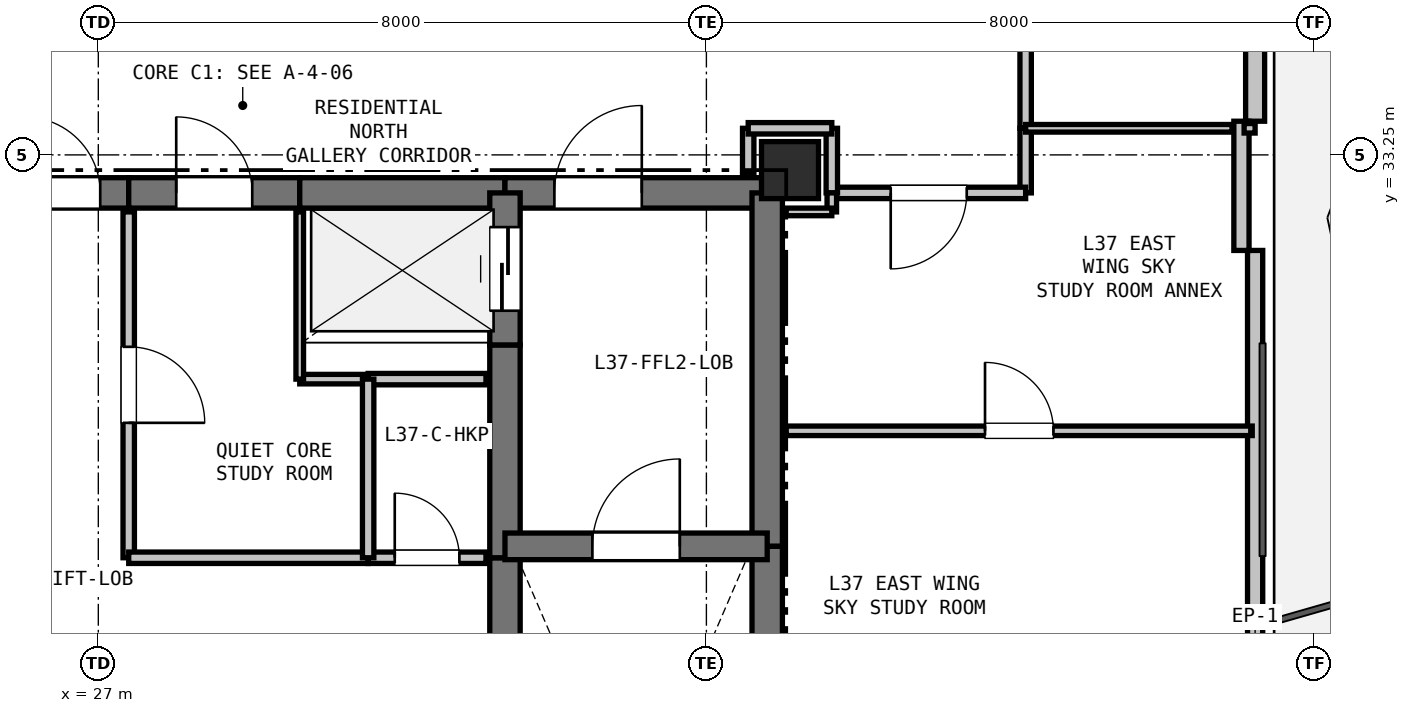
"""IFC4 building model, lengths in metres.
Left out: names, types, materials, properties, quantities, classifications, styles, units other than length and angle.
Written with IfcOpenShell. Run it as: python <this file> out.ifc"""

import sys

from ifc_helpers import new_model, si_unit, direction, frame, frame_2d, origin, origin_2d, place, context, subcontext, project, spatial, rectangle, extrude, element, fill, save


model = new_model("IFC4")
c1 = context("Model", 3, precision=1e-05, world=origin(), true_north=direction((0.0, 1.0)))
c2 = subcontext(c1, "Body", "Model", "MODEL_VIEW")
j1 = project(units=[si_unit("LENGTHUNIT", "METRE"), si_unit("PLANEANGLEUNIT", "RADIAN")], contexts=[c1])
p1 = place(None, origin())
s1 = spatial("IfcSite", under=j1, at=p1, CompositionType="ELEMENT")
p2 = place(p1, origin())
s2 = spatial("IfcBuilding", under=s1, at=p2, CompositionType="ELEMENT")
p3 = place(p2, frame((0.0, 0.0, 134.4)))
s3 = spatial("IfcBuildingStorey", under=s2, at=p3, CompositionType="ELEMENT", Elevation=134.4)
p4 = place(p3, frame((36.1, 33.05, 0.0), z_axis=(0.0, 0.0, 1.0), x_axis=(1.0, 0.0, 0.0)))
e1 = element("IfcColumn", 1, at=p4, inside=s3, PredefinedType="COLUMN", context=c2, shape_type="SweptSolid", body=[
    extrude(rectangle(XDim=0.75, YDim=0.75, at=origin_2d()), origin(), (0.0, 0.0, 1.0), 3.3),
])
p5 = place(p3, frame((42.219, 44.879, 0.0), z_axis=(0.0, 0.0, 1.0), x_axis=(0.0, -1.0, 0.0)))
e2 = element("IfcWall", 2, at=p5, inside=s3, PredefinedType="SOLIDWALL", context=c2, shape_type="SweptSolid", body=[
    extrude(rectangle(XDim=11.186, YDim=0.25, at=frame_2d((5.593, 0.0))), origin(), (0.0, 0.0, 1.0), 2.68),
])
p6 = place(p5, frame((8.109, 0.0, 0.0)))
e3 = element("IfcOpeningElement", 3, at=p6, cuts=e2, PredefinedType="OPENING", context=c2, shape_type="SweptSolid", body=[
    extrude(rectangle(XDim=1.0, YDim=2.1, at=frame_2d((0.5, 1.05))), frame((0.0, 0.135, 0.0), z_axis=(0.0, -1.0, 0.0), x_axis=(1.0, 0.0, 0.0)), (0.0, 0.0, 1.0), 0.27),
])
p7 = place(p5, frame((3.886, 0.0, 0.9)))
e4 = element("IfcOpeningElement", 4, at=p7, cuts=e2, PredefinedType="OPENING", context=c2, shape_type="SweptSolid", body=[
    extrude(rectangle(XDim=1.2, YDim=1.4, at=frame_2d((0.6, 0.7))), frame((0.0, 0.135, 0.0), z_axis=(0.0, -1.0, 0.0), x_axis=(1.0, 0.0, 0.0)), (0.0, 0.0, 1.0), 0.27),
])
p8 = place(p3, frame((42.219, 31.993, 0.0), z_axis=(0.0, 0.0, 1.0), x_axis=(0.0, -1.0, 0.0)))
e5 = element("IfcWall", 5, at=p8, inside=s3, PredefinedType="PARAPET", context=c2, shape_type="SweptSolid", body=[
    extrude(rectangle(XDim=10.486, YDim=0.2, at=frame_2d((5.243, 0.0))), origin(), (0.0, 0.0, 1.0), 0.2),
])
p9 = place(p3, frame((42.039, 33.693, 0.0), z_axis=(0.0, 0.0, 1.0), x_axis=(0.0, -1.0, 0.0)))
e6 = element("IfcWall", 6, at=p9, inside=s3, PredefinedType="PARAPET", context=c2, shape_type="SweptSolid", body=[
    extrude(rectangle(XDim=1.7, YDim=0.2, at=frame_2d((0.85, 0.0))), origin(), (0.0, 0.0, 1.0), 2.68),
])
p10 = place(p3, frame((25.65, 32.75, 0.0), z_axis=(0.0, 0.0, 1.0), x_axis=(1.0, 0.0, 0.0)))
e7 = element("IfcWall", 7, at=p10, inside=s3, PredefinedType="SHEAR", context=c2, shape_type="SweptSolid", body=[
    extrude(rectangle(XDim=1.75, YDim=0.4, at=frame_2d((0.875, 0.0))), origin(), (0.0, 0.0, 1.0), 3.06),
])
p11 = place(p10, frame((0.375, 0.0, 0.0)))
e8 = element("IfcOpeningElement", 8, at=p11, cuts=e7, PredefinedType="OPENING", context=c2, shape_type="SweptSolid", body=[
    extrude(rectangle(XDim=1.0, YDim=2.15, at=frame_2d((0.5, 1.075))), frame((0.0, 0.21, 0.0), z_axis=(0.0, -1.0, 0.0), x_axis=(1.0, 0.0, 0.0)), (0.0, 0.0, 1.0), 0.42),
])
p12 = place(p3, frame((27.4, 32.75, 0.0), z_axis=(0.0, 0.0, 1.0), x_axis=(1.0, 0.0, 0.0)))
e9 = element("IfcWall", 9, at=p12, inside=s3, PredefinedType="SHEAR", context=c2, shape_type="SweptSolid", body=[
    extrude(rectangle(XDim=2.25, YDim=0.4, at=frame_2d((1.125, 0.0))), origin(), (0.0, 0.0, 1.0), 3.06),
])
p13 = place(p12, frame((0.625, 0.0, 0.0)))
e10 = element("IfcOpeningElement", 10, at=p13, cuts=e9, PredefinedType="OPENING", context=c2, shape_type="SweptSolid", body=[
    extrude(rectangle(XDim=1.0, YDim=2.15, at=frame_2d((0.5, 1.075))), frame((0.0, 0.21, 0.0), z_axis=(0.0, -1.0, 0.0), x_axis=(1.0, 0.0, 0.0)), (0.0, 0.0, 1.0), 0.42),
])
p14 = place(p3, frame((29.65, 32.75, 0.0), z_axis=(0.0, 0.0, 1.0), x_axis=(1.0, 0.0, 0.0)))
e11 = element("IfcWall", 11, at=p14, inside=s3, PredefinedType="SHEAR", context=c2, shape_type="SweptSolid", body=[
    extrude(rectangle(XDim=2.7, YDim=0.4, at=frame_2d((1.35, 0.0))), origin(), (0.0, 0.0, 1.0), 3.06),
])
p15 = place(p3, frame((32.35, 32.75, 0.0), z_axis=(0.0, 0.0, 1.0), x_axis=(1.0, 0.0, 0.0)))
e12 = element("IfcWall", 12, at=p15, inside=s3, PredefinedType="SHEAR", context=c2, shape_type="SweptSolid", body=[
    extrude(rectangle(XDim=3.45, YDim=0.4, at=frame_2d((1.725, 0.0))), origin(), (0.0, 0.0, 1.0), 3.06),
])
p16 = place(p15, frame((0.65, 0.0, 0.0)))
e13 = element("IfcOpeningElement", 13, at=p16, cuts=e12, PredefinedType="OPENING", context=c2, shape_type="SweptSolid", body=[
    extrude(rectangle(XDim=1.15, YDim=2.15, at=frame_2d((0.575, 1.075))), frame((0.0, 0.21, 0.0), z_axis=(0.0, -1.0, 0.0), x_axis=(1.0, 0.0, 0.0)), (0.0, 0.0, 1.0), 0.42),
])
p17 = place(p3, frame((35.8, 32.75, 0.0), z_axis=(0.0, 0.0, 1.0), x_axis=(0.0, -1.0, 0.0)))
e14 = element("IfcWall", 14, at=p17, inside=s3, PredefinedType="SHEAR", context=c2, shape_type="SweptSolid", body=[
    extrude(rectangle(XDim=4.65, YDim=0.4, at=frame_2d((2.325, 0.0))), origin(), (0.0, 0.0, 1.0), 3.06),
])
p18 = place(p3, frame((35.8, 28.1, 0.0), z_axis=(0.0, 0.0, 1.0), x_axis=(0.0, -1.0, 0.0)))
e15 = element("IfcWall", 15, at=p18, inside=s3, PredefinedType="SHEAR", context=c2, shape_type="SweptSolid", body=[
    extrude(rectangle(XDim=7.35, YDim=0.4, at=frame_2d((3.675, 0.0))), origin(), (0.0, 0.0, 1.0), 3.06),
])
p19 = place(p3, frame((32.35, 25.55, 0.0), z_axis=(0.0, 0.0, 1.0), x_axis=(0.0, 1.0, 0.0)))
e16 = element("IfcWall", 16, at=p19, inside=s3, PredefinedType="SHEAR", context=c2, shape_type="SweptSolid", body=[
    extrude(rectangle(XDim=2.4, YDim=0.4, at=frame_2d((1.2, 0.0))), origin(), (0.0, 0.0, 1.0), 3.06),
])
p20 = place(p3, frame((32.35, 27.95, 0.0), z_axis=(0.0, 0.0, 1.0), x_axis=(0.0, 1.0, 0.0)))
e17 = element("IfcWall", 17, at=p20, inside=s3, PredefinedType="SHEAR", context=c2, shape_type="SweptSolid", body=[
    extrude(rectangle(XDim=2.8, YDim=0.4, at=frame_2d((1.4, 0.0))), origin(), (0.0, 0.0, 1.0), 3.06),
])
p21 = place(p3, frame((32.35, 30.75, 0.0), z_axis=(0.0, 0.0, 1.0), x_axis=(0.0, 1.0, 0.0)))
e18 = element("IfcWall", 18, at=p21, inside=s3, PredefinedType="SHEAR", context=c2, shape_type="SweptSolid", body=[
    extrude(rectangle(XDim=2.0, YDim=0.4, at=frame_2d((1.0, 0.0))), origin(), (0.0, 0.0, 1.0), 3.06),
])
p22 = place(p21, frame((0.45, 0.0, 0.0)))
e19 = element("IfcOpeningElement", 19, at=p22, cuts=e18, PredefinedType="OPENING", context=c2, shape_type="SweptSolid", body=[
    extrude(rectangle(XDim=1.1, YDim=2.15, at=frame_2d((0.55, 1.075))), frame((0.0, 0.21, 0.0), z_axis=(0.0, -1.0, 0.0), x_axis=(1.0, 0.0, 0.0)), (0.0, 0.0, 1.0), 0.42),
])
p23 = place(p3, frame((32.35, 28.1, 0.0), z_axis=(0.0, 0.0, 1.0), x_axis=(1.0, 0.0, 0.0)))
e20 = element("IfcWall", 20, at=p23, inside=s3, PredefinedType="SHEAR", context=c2, shape_type="SweptSolid", body=[
    extrude(rectangle(XDim=3.45, YDim=0.35, at=frame_2d((1.725, 0.0))), origin(), (0.0, 0.0, 1.0), 3.06),
])
p24 = place(p23, frame((1.15, 0.0, 0.0)))
e21 = element("IfcOpeningElement", 21, at=p24, cuts=e20, PredefinedType="OPENING", context=c2, shape_type="SweptSolid", body=[
    extrude(rectangle(XDim=1.15, YDim=2.15, at=frame_2d((0.575, 1.075))), frame((0.0, 0.185, 0.0), z_axis=(0.0, -1.0, 0.0), x_axis=(1.0, 0.0, 0.0)), (0.0, 0.0, 1.0), 0.37),
])
p25 = place(p3, frame((32.1, 30.3, 0.0), z_axis=(0.0, 0.0, 1.0), x_axis=(-1.0, 0.0, 0.0)))
e22 = element("IfcWall", 22, at=p25, inside=s3, PredefinedType="PARTITIONING", context=c2, shape_type="SweptSolid", body=[
    extrude(rectangle(XDim=1.55, YDim=0.15, at=frame_2d((0.775, 0.0))), origin(), (0.0, 0.0, 1.0), 3.06),
])
p26 = place(p3, frame((30.55, 30.3, 0.0), z_axis=(0.0, 0.0, 1.0), x_axis=(-1.0, 0.0, 0.0)))
e23 = element("IfcWall", 23, at=p26, inside=s3, PredefinedType="PARTITIONING", context=c2, shape_type="SweptSolid", body=[
    extrude(rectangle(XDim=0.9, YDim=0.125, at=frame_2d((0.45, 0.0))), origin(), (0.0, 0.0, 1.0), 3.06),
])
p27 = place(p3, frame((29.65, 30.3, 0.0), z_axis=(0.0, 0.0, 1.0), x_axis=(0.0, 1.0, 0.0)))
e24 = element("IfcWall", 24, at=p27, inside=s3, PredefinedType="PARTITIONING", context=c2, shape_type="SweptSolid", body=[
    extrude(rectangle(XDim=2.2, YDim=0.1, at=frame_2d((1.1, 0.0))), origin(), (0.0, 0.0, 1.0), 3.06),
])
p28 = place(p3, frame((27.4, 32.5, 0.0), z_axis=(0.0, 0.0, 1.0), x_axis=(0.0, -1.0, 0.0)))
e25 = element("IfcWall", 25, at=p28, inside=s3, PredefinedType="PARTITIONING", context=c2, shape_type="SweptSolid", body=[
    extrude(rectangle(XDim=4.55, YDim=0.15, at=frame_2d((2.275, 0.0))), origin(), (0.0, 0.0, 1.0), 3.06),
])
p29 = place(p28, frame((1.775, 0.0, 0.0)))
e26 = element("IfcOpeningElement", 26, at=p29, cuts=e25, PredefinedType="OPENING", context=c2, shape_type="SweptSolid", body=[
    extrude(rectangle(XDim=1.0, YDim=2.15, at=frame_2d((0.5, 1.075))), frame((0.0, 0.085, 0.0), z_axis=(0.0, -1.0, 0.0), x_axis=(1.0, 0.0, 0.0)), (0.0, 0.0, 1.0), 0.17),
])
p30 = place(p3, frame((27.4, 27.95, 0.0), z_axis=(0.0, 0.0, 1.0), x_axis=(1.0, 0.0, 0.0)))
e27 = element("IfcWall", 27, at=p30, inside=s3, PredefinedType="PARTITIONING", context=c2, shape_type="SweptSolid", body=[
    extrude(rectangle(XDim=3.15, YDim=0.15, at=frame_2d((1.575, 0.0))), origin(), (0.0, 0.0, 1.0), 3.06),
])
p31 = place(p3, frame((30.55, 27.95, 0.0), z_axis=(0.0, 0.0, 1.0), x_axis=(1.0, 0.0, 0.0)))
e28 = element("IfcWall", 28, at=p31, inside=s3, PredefinedType="PARTITIONING", context=c2, shape_type="SweptSolid", body=[
    extrude(rectangle(XDim=1.55, YDim=0.15, at=frame_2d((0.775, 0.0))), origin(), (0.0, 0.0, 1.0), 3.06),
])
p32 = place(p31, frame((0.35, 0.0, 0.0)))
e29 = element("IfcOpeningElement", 29, at=p32, cuts=e28, PredefinedType="OPENING", context=c2, shape_type="SweptSolid", body=[
    extrude(rectangle(XDim=0.85, YDim=2.1, at=frame_2d((0.425, 1.05))), frame((0.0, 0.085, 0.0), z_axis=(0.0, -1.0, 0.0), x_axis=(1.0, 0.0, 0.0)), (0.0, 0.0, 1.0), 0.17),
])
p33 = place(p3, frame((35.55, 33.6, 0.0), z_axis=(0.0, 0.0, 1.0), x_axis=(0.0, -1.0, 0.0)))
e30 = element("IfcWall", 30, at=p33, inside=s3, PredefinedType="PARTITIONING", context=c2, shape_type="SweptSolid", body=[
    extrude(rectangle(XDim=0.6, YDim=0.15, at=frame_2d((0.3, 0.0))), origin(), (0.0, 0.0, 1.0), 2.508),
])
p34 = place(p3, frame((39.2, 35.35, 0.0), z_axis=(0.0, 0.0, 1.0), x_axis=(0.0, -1.0, 0.0)))
e31 = element("IfcWall", 31, at=p34, inside=s3, PredefinedType="PARTITIONING", context=c2, shape_type="SweptSolid", body=[
    extrude(rectangle(XDim=1.75, YDim=0.15, at=frame_2d((0.875, 0.0))), origin(), (0.0, 0.0, 1.0), 3.06),
])
p35 = place(p3, frame((39.2, 33.6, 0.0), z_axis=(0.0, 0.0, 1.0), x_axis=(0.0, -1.0, 0.0)))
e32 = element("IfcWall", 32, at=p35, inside=s3, PredefinedType="PARTITIONING", context=c2, shape_type="SweptSolid", body=[
    extrude(rectangle(XDim=0.85, YDim=0.15, at=frame_2d((0.425, 0.0))), origin(), (0.0, 0.0, 1.0), 3.06),
])
p36 = place(p3, frame((39.2, 32.75, 0.0), z_axis=(0.0, 0.0, 1.0), x_axis=(-1.0, 0.0, 0.0)))
e33 = element("IfcWall", 33, at=p36, inside=s3, PredefinedType="PARTITIONING", context=c2, shape_type="SweptSolid", body=[
    extrude(rectangle(XDim=2.55, YDim=0.15, at=frame_2d((1.275, 0.0))), origin(), (0.0, 0.0, 1.0), 3.06),
])
p37 = place(p36, frame((0.775, 0.0, 0.0)))
e34 = element("IfcOpeningElement", 34, at=p37, cuts=e33, PredefinedType="OPENING", context=c2, shape_type="SweptSolid", body=[
    extrude(rectangle(XDim=1.0, YDim=2.15, at=frame_2d((0.5, 1.075))), frame((0.0, 0.085, 0.0), z_axis=(0.0, -1.0, 0.0), x_axis=(1.0, 0.0, 0.0)), (0.0, 0.0, 1.0), 0.17),
])
p38 = place(p3, frame((36.65, 32.75, 0.0), z_axis=(0.0, 0.0, 1.0), x_axis=(0.0, 1.0, 0.0)))
e35 = element("IfcWall", 35, at=p38, inside=s3, PredefinedType="PARTITIONING", context=c2, shape_type="SweptSolid", body=[
    extrude(rectangle(XDim=0.85, YDim=0.15, at=frame_2d((0.425, 0.0))), origin(), (0.0, 0.0, 1.0), 2.433),
])
p39 = place(p3, frame((36.65, 33.6, 0.0), z_axis=(0.0, 0.0, 1.0), x_axis=(-1.0, 0.0, 0.0)))
e36 = element("IfcWall", 36, at=p39, inside=s3, PredefinedType="PARTITIONING", context=c2, shape_type="SweptSolid", body=[
    extrude(rectangle(XDim=1.1, YDim=0.15, at=frame_2d((0.55, 0.0))), origin(), (0.0, 0.0, 1.0), 2.433),
])
p40 = place(p3, frame((30.55, 30.3, 0.0), z_axis=(0.0, 0.0, 1.0), x_axis=(0.0, -1.0, 0.0)))
e37 = element("IfcWall", 37, at=p40, inside=s3, PredefinedType="PARTITIONING", context=c2, shape_type="SweptSolid", body=[
    extrude(rectangle(XDim=2.35, YDim=0.15, at=frame_2d((1.175, 0.0))), origin(), (0.0, 0.0, 1.0), 3.06),
])
p41 = place(p3, frame((36.05, 29.62, 0.0), z_axis=(0.0, 0.0, 1.0), x_axis=(1.0, 0.0, 0.0)))
e38 = element("IfcWall", 38, at=p41, inside=s3, PredefinedType="PARTITIONING", context=c2, shape_type="SweptSolid", body=[
    extrude(rectangle(XDim=6.131, YDim=0.125, at=frame_2d((3.065, 0.0))), origin(), (0.0, 0.0, 1.0), 2.365),
])
p42 = place(p41, frame((2.615, 0.0, 0.0)))
e39 = element("IfcOpeningElement", 39, at=p42, cuts=e38, PredefinedType="OPENING", context=c2, shape_type="SweptSolid", body=[
    extrude(rectangle(XDim=0.9, YDim=2.1, at=frame_2d((0.45, 1.05))), frame((0.0, 0.073, 0.0), z_axis=(0.0, -1.0, 0.0), x_axis=(1.0, 0.0, 0.0)), (0.0, 0.0, 1.0), 0.145),
])
p43 = place(p3, frame((36.65, 32.5, 0.0), z_axis=(0.0, 0.0, 1.0), x_axis=(0.0, 1.0, 0.0)))
e40 = element("IfcWall", 40, at=p43, inside=s3, PredefinedType="PARTITIONING", context=c2, shape_type="SweptSolid", body=[
    extrude(rectangle(XDim=0.25, YDim=0.125, at=frame_2d((0.125, 0.0))), origin(), (0.0, 0.0, 1.0), 3.06),
])
p44 = place(p3, frame((39.2, 33.6, 0.0), z_axis=(0.0, 0.0, 1.0), x_axis=(1.0, 0.0, 0.0)))
e41 = element("IfcWall", 41, at=p44, inside=s3, PredefinedType="PARTITIONING", context=c2, shape_type="SweptSolid", body=[
    extrude(rectangle(XDim=2.715, YDim=0.1, at=frame_2d((1.358, 0.0))), origin(), (0.0, 0.0, 1.0), 2.365),
])
p45 = place(p3, frame((42.074, 33.6, 0.0), z_axis=(0.0, 0.0, 1.0), x_axis=(1.0, 0.0, 0.0)))
e42 = element("IfcWall", 42, at=p45, inside=s3, PredefinedType="PARTITIONING", context=c2, shape_type="SweptSolid", body=[
    extrude(rectangle(XDim=0.145, YDim=0.125, at=frame_2d((0.072, 0.0))), origin(), (0.0, 0.0, 1.0), 3.06),
])
p46 = place(p3, frame((36.05, 32.5, 0.0), z_axis=(0.0, 0.0, 1.0), x_axis=(1.0, 0.0, 0.0)))
e43 = element("IfcWall", 43, at=p46, inside=s3, PredefinedType="PARTITIONING", context=c2, shape_type="SweptSolid", body=[
    extrude(rectangle(XDim=0.6, YDim=0.1, at=frame_2d((0.3, 0.0))), origin(), (0.0, 0.0, 1.0), 2.508),
])
p47 = place(p11, origin())
e44 = element("IfcDoor", 44, at=p47, inside=s3, OperationType="SINGLE_SWING_LEFT", PredefinedType="DOOR", context=c2, shape_type="SweptSolid", body=[
    extrude(rectangle(XDim=1.0, YDim=2.15, at=frame_2d((0.5, 1.075))), frame((0.0, 0.025, 0.0), z_axis=(0.0, -1.0, 0.0), x_axis=(1.0, 0.0, 0.0)), (0.0, 0.0, 1.0), 0.05),
])
fill(e8, e44)
p48 = place(p22, origin())
e45 = element("IfcDoor", 45, at=p48, inside=s3, OperationType="SLIDING_TO_LEFT", PredefinedType="DOOR", context=c2, shape_type="SweptSolid", body=[
    extrude(rectangle(XDim=1.1, YDim=2.15, at=frame_2d((0.55, 1.075))), frame((0.0, 0.025, 0.0), z_axis=(0.0, -1.0, 0.0), x_axis=(1.0, 0.0, 0.0)), (0.0, 0.0, 1.0), 0.05),
])
fill(e19, e45)
p49 = place(p24, origin())
e46 = element("IfcDoor", 46, at=p49, inside=s3, OperationType="SINGLE_SWING_RIGHT", PredefinedType="DOOR", context=c2, shape_type="SweptSolid", body=[
    extrude(rectangle(XDim=1.15, YDim=2.15, at=frame_2d((0.575, 1.075))), frame((0.0, 0.025, 0.0), z_axis=(0.0, -1.0, 0.0), x_axis=(1.0, 0.0, 0.0)), (0.0, 0.0, 1.0), 0.05),
])
fill(e21, e46)
p50 = place(p16, origin())
e47 = element("IfcDoor", 47, at=p50, inside=s3, OperationType="SINGLE_SWING_RIGHT", PredefinedType="DOOR", context=c2, shape_type="SweptSolid", body=[
    extrude(rectangle(XDim=1.15, YDim=2.15, at=frame_2d((0.575, 1.075))), frame((0.0, 0.025, 0.0), z_axis=(0.0, -1.0, 0.0), x_axis=(1.0, 0.0, 0.0)), (0.0, 0.0, 1.0), 0.05),
])
fill(e13, e47)
p51 = place(p29, origin())
e48 = element("IfcDoor", 48, at=p51, inside=s3, OperationType="SINGLE_SWING_RIGHT", PredefinedType="DOOR", context=c2, shape_type="SweptSolid", body=[
    extrude(rectangle(XDim=1.0, YDim=2.15, at=frame_2d((0.5, 1.075))), frame((0.0, 0.025, 0.0), z_axis=(0.0, -1.0, 0.0), x_axis=(1.0, 0.0, 0.0)), (0.0, 0.0, 1.0), 0.05),
])
fill(e26, e48)
p52 = place(p32, origin())
e49 = element("IfcDoor", 49, at=p52, inside=s3, OperationType="SINGLE_SWING_LEFT", PredefinedType="DOOR", context=c2, shape_type="SweptSolid", body=[
    extrude(rectangle(XDim=0.85, YDim=2.1, at=frame_2d((0.425, 1.05))), frame((0.0, 0.025, 0.0), z_axis=(0.0, -1.0, 0.0), x_axis=(1.0, 0.0, 0.0)), (0.0, 0.0, 1.0), 0.05),
])
fill(e29, e49)
p53 = place(p13, origin())
e50 = element("IfcDoor", 50, at=p53, inside=s3, OperationType="SINGLE_SWING_LEFT", PredefinedType="DOOR", context=c2, shape_type="SweptSolid", body=[
    extrude(rectangle(XDim=1.0, YDim=2.15, at=frame_2d((0.5, 1.075))), frame((0.0, 0.025, 0.0), z_axis=(0.0, -1.0, 0.0), x_axis=(1.0, 0.0, 0.0)), (0.0, 0.0, 1.0), 0.05),
])
fill(e10, e50)
p54 = place(p37, origin())
e51 = element("IfcDoor", 51, at=p54, inside=s3, OperationType="SINGLE_SWING_RIGHT", PredefinedType="DOOR", context=c2, shape_type="SweptSolid", body=[
    extrude(rectangle(XDim=1.0, YDim=2.15, at=frame_2d((0.5, 1.075))), frame((0.0, 0.025, 0.0), z_axis=(0.0, -1.0, 0.0), x_axis=(1.0, 0.0, 0.0)), (0.0, 0.0, 1.0), 0.05),
])
fill(e34, e51)
p55 = place(p42, origin())
e52 = element("IfcDoor", 52, at=p55, inside=s3, OperationType="SINGLE_SWING_LEFT", PredefinedType="DOOR", context=c2, shape_type="SweptSolid", body=[
    extrude(rectangle(XDim=0.9, YDim=2.1, at=frame_2d((0.45, 1.05))), frame((0.0, 0.025, 0.0), z_axis=(0.0, -1.0, 0.0), x_axis=(1.0, 0.0, 0.0)), (0.0, 0.0, 1.0), 0.05),
])
fill(e39, e52)
save(model, sys.argv[1])
